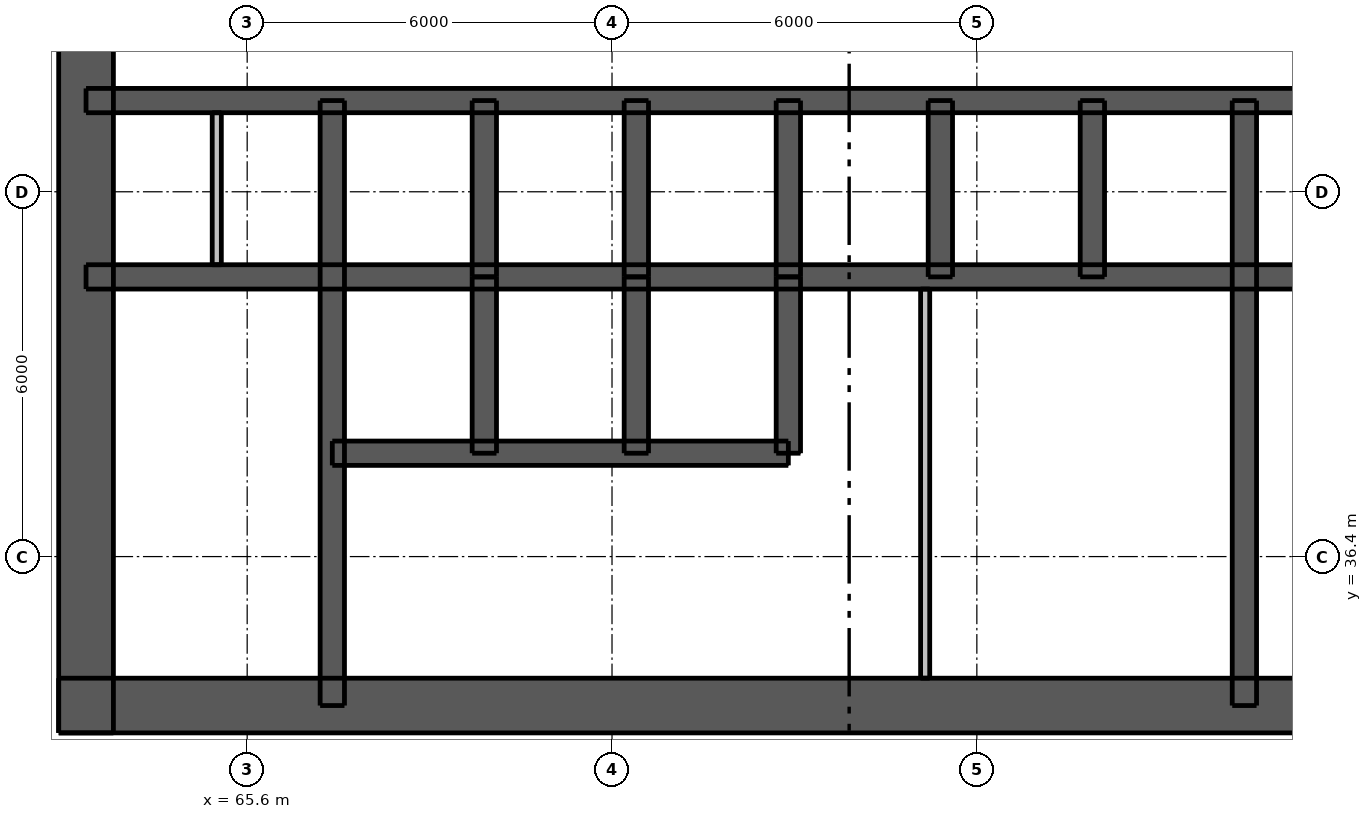
"""IFC4 building model, lengths in metres.
Left out: names, types, materials, properties, quantities, classifications, styles, units other than length and angle.
Written with IfcOpenShell. Run it as: python <this file> out.ifc"""

import sys

from ifc_helpers import new_model, si_unit, direction, frame, frame_2d, origin, place, context, subcontext, project, spatial, rectangle, extrude, element, fill, save


model = new_model("IFC4")
c1 = context("Model", 3, precision=1e-05, world=origin(), true_north=direction((0.0, 1.0)))
c2 = subcontext(c1, "Body", "Model", "MODEL_VIEW")
j1 = project(units=[si_unit("LENGTHUNIT", "METRE"), si_unit("PLANEANGLEUNIT", "RADIAN")], contexts=[c1])
p1 = place(None, origin())
s1 = spatial("IfcSite", under=j1, at=p1, CompositionType="ELEMENT")
p2 = place(p1, origin())
s2 = spatial("IfcBuilding", under=s1, at=p2, CompositionType="ELEMENT")
p3 = place(p2, frame((0.0, 0.0, 36.7)))
s3 = spatial("IfcBuildingStorey", under=s2, at=p3, CompositionType="ELEMENT", Elevation=36.7)
p4 = place(p3, frame((62.5, 33.95, 0.0), z_axis=(0.0, 0.0, 1.0), x_axis=(1.0, 0.0, 0.0)))
e1 = element("IfcWall", 1, at=p4, inside=s3, PredefinedType="SHEAR", context=c2, shape_type="SweptSolid", body=[
    extrude(rectangle(XDim=24.0, YDim=0.9, at=frame_2d((12.0, 0.0))), origin(), (0.0, 0.0, 1.0), 3.05),
])
p5 = place(p4, frame((2.05, 0.0, 0.0)))
e2 = element("IfcOpeningElement", 2, at=p5, cuts=e1, PredefinedType="OPENING", context=c2, shape_type="SweptSolid", body=[
    extrude(rectangle(XDim=1.1, YDim=2.1, at=frame_2d((0.55, 1.05))), frame((0.0, 0.46, 0.0), z_axis=(0.0, -1.0, 0.0), x_axis=(1.0, 0.0, 0.0)), (0.0, 0.0, 1.0), 0.92),
])
p6 = place(p4, frame((20.85, 0.0, 0.0)))
e3 = element("IfcOpeningElement", 3, at=p6, cuts=e1, PredefinedType="OPENING", context=c2, shape_type="SweptSolid", body=[
    extrude(rectangle(XDim=1.1, YDim=2.1, at=frame_2d((0.55, 1.05))), frame((0.0, 0.46, 0.0), z_axis=(0.0, -1.0, 0.0), x_axis=(1.0, 0.0, 0.0)), (0.0, 0.0, 1.0), 0.92),
])
p7 = place(p4, frame((8.0, 0.0, 0.0)))
e4 = element("IfcOpeningElement", 4, at=p7, cuts=e1, PredefinedType="OPENING", context=c2, shape_type="SweptSolid", body=[
    extrude(rectangle(XDim=1.1, YDim=2.1, at=frame_2d((0.55, 1.05))), frame((0.0, 0.46, 0.0), z_axis=(0.0, -1.0, 0.0), x_axis=(1.0, 0.0, 0.0)), (0.0, 0.0, 1.0), 0.92),
])
p8 = place(p4, frame((16.363, 0.0, 0.0)))
e5 = element("IfcOpeningElement", 5, at=p8, cuts=e1, PredefinedType="OPENING", context=c2, shape_type="SweptSolid", body=[
    extrude(rectangle(XDim=0.9, YDim=2.1, at=frame_2d((0.45, 1.05))), frame((0.0, 0.46, 0.0), z_axis=(0.0, -1.0, 0.0), x_axis=(1.0, 0.0, 0.0)), (0.0, 0.0, 1.0), 0.92),
])
p9 = place(p3, frame((62.95, 33.5, 0.0), z_axis=(0.0, 0.0, 1.0), x_axis=(0.0, 1.0, 0.0)))
e6 = element("IfcWall", 6, at=p9, inside=s3, PredefinedType="SHEAR", context=c2, shape_type="SweptSolid", body=[
    extrude(rectangle(XDim=24.0, YDim=0.9, at=frame_2d((12.0, 0.0))), origin(), (0.0, 0.0, 1.0), 3.05),
])
p10 = place(p9, frame((11.2, 0.0, 0.0)))
e7 = element("IfcOpeningElement", 7, at=p10, cuts=e6, PredefinedType="OPENING", context=c2, shape_type="SweptSolid", body=[
    extrude(rectangle(XDim=1.6, YDim=2.1, at=frame_2d((0.8, 1.05))), frame((0.0, 0.46, 0.0), z_axis=(0.0, -1.0, 0.0), x_axis=(1.0, 0.0, 0.0)), (0.0, 0.0, 1.0), 0.92),
])
p11 = place(p3, frame((62.95, 41.0, 0.0), z_axis=(0.0, 0.0, 1.0), x_axis=(1.0, 0.0, 0.0)))
e8 = element("IfcWall", 8, at=p11, inside=s3, PredefinedType="SHEAR", context=c2, shape_type="SweptSolid", body=[
    extrude(rectangle(XDim=23.1, YDim=0.4, at=frame_2d((11.55, 0.0))), origin(), (0.0, 0.0, 1.0), 3.05),
])
p12 = place(p3, frame((62.95, 43.9, 0.0), z_axis=(0.0, 0.0, 1.0), x_axis=(1.0, 0.0, 0.0)))
e9 = element("IfcWall", 9, at=p12, inside=s3, PredefinedType="SHEAR", context=c2, shape_type="SweptSolid", body=[
    extrude(rectangle(XDim=23.1, YDim=0.4, at=frame_2d((11.55, 0.0))), origin(), (0.0, 0.0, 1.0), 3.05),
])
p13 = place(p12, frame((0.85, 0.0, 0.0)))
e10 = element("IfcOpeningElement", 10, at=p13, cuts=e9, PredefinedType="OPENING", context=c2, shape_type="SweptSolid", body=[
    extrude(rectangle(XDim=0.9, YDim=2.1, at=frame_2d((0.45, 1.05))), frame((0.0, 0.21, 0.0), z_axis=(0.0, -1.0, 0.0), x_axis=(1.0, 0.0, 0.0)), (0.0, 0.0, 1.0), 0.42),
])
p14 = place(p12, frame((2.55, 0.0, 0.0)))
e11 = element("IfcOpeningElement", 11, at=p14, cuts=e9, PredefinedType="OPENING", context=c2, shape_type="SweptSolid", body=[
    extrude(rectangle(XDim=0.9, YDim=2.1, at=frame_2d((0.45, 1.05))), frame((0.0, 0.21, 0.0), z_axis=(0.0, -1.0, 0.0), x_axis=(1.0, 0.0, 0.0)), (0.0, 0.0, 1.0), 0.42),
])
p15 = place(p12, frame((20.5, 0.0, 0.0)))
e12 = element("IfcOpeningElement", 12, at=p15, cuts=e9, PredefinedType="OPENING", context=c2, shape_type="SweptSolid", body=[
    extrude(rectangle(XDim=0.9, YDim=2.1, at=frame_2d((0.45, 1.05))), frame((0.0, 0.21, 0.0), z_axis=(0.0, -1.0, 0.0), x_axis=(1.0, 0.0, 0.0)), (0.0, 0.0, 1.0), 0.42),
])
p16 = place(p12, frame((4.75, 0.0, 0.0)))
e13 = element("IfcOpeningElement", 13, at=p16, cuts=e9, PredefinedType="OPENING", context=c2, shape_type="SweptSolid", body=[
    extrude(rectangle(XDim=1.1, YDim=2.1, at=frame_2d((0.55, 1.05))), frame((0.0, 0.21, 0.0), z_axis=(0.0, -1.0, 0.0), x_axis=(1.0, 0.0, 0.0)), (0.0, 0.0, 1.0), 0.42),
])
p17 = place(p12, frame((7.25, 0.0, 0.0)))
e14 = element("IfcOpeningElement", 14, at=p17, cuts=e9, PredefinedType="OPENING", context=c2, shape_type="SweptSolid", body=[
    extrude(rectangle(XDim=1.1, YDim=2.1, at=frame_2d((0.55, 1.05))), frame((0.0, 0.21, 0.0), z_axis=(0.0, -1.0, 0.0), x_axis=(1.0, 0.0, 0.0)), (0.0, 0.0, 1.0), 0.42),
])
p18 = place(p12, frame((9.75, 0.0, 0.0)))
e15 = element("IfcOpeningElement", 15, at=p18, cuts=e9, PredefinedType="OPENING", context=c2, shape_type="SweptSolid", body=[
    extrude(rectangle(XDim=1.1, YDim=2.1, at=frame_2d((0.55, 1.05))), frame((0.0, 0.21, 0.0), z_axis=(0.0, -1.0, 0.0), x_axis=(1.0, 0.0, 0.0)), (0.0, 0.0, 1.0), 0.42),
])
p19 = place(p12, frame((12.25, 0.0, 0.0)))
e16 = element("IfcOpeningElement", 16, at=p19, cuts=e9, PredefinedType="OPENING", context=c2, shape_type="SweptSolid", body=[
    extrude(rectangle(XDim=1.1, YDim=2.1, at=frame_2d((0.55, 1.05))), frame((0.0, 0.21, 0.0), z_axis=(0.0, -1.0, 0.0), x_axis=(1.0, 0.0, 0.0)), (0.0, 0.0, 1.0), 0.42),
])
p20 = place(p12, frame((14.75, 0.0, 0.0)))
e17 = element("IfcOpeningElement", 17, at=p20, cuts=e9, PredefinedType="OPENING", context=c2, shape_type="SweptSolid", body=[
    extrude(rectangle(XDim=1.1, YDim=2.1, at=frame_2d((0.55, 1.05))), frame((0.0, 0.21, 0.0), z_axis=(0.0, -1.0, 0.0), x_axis=(1.0, 0.0, 0.0)), (0.0, 0.0, 1.0), 0.42),
])
p21 = place(p12, frame((17.25, 0.0, 0.0)))
e18 = element("IfcOpeningElement", 18, at=p21, cuts=e9, PredefinedType="OPENING", context=c2, shape_type="SweptSolid", body=[
    extrude(rectangle(XDim=1.1, YDim=2.1, at=frame_2d((0.55, 1.05))), frame((0.0, 0.21, 0.0), z_axis=(0.0, -1.0, 0.0), x_axis=(1.0, 0.0, 0.0)), (0.0, 0.0, 1.0), 0.42),
])
p22 = place(p3, frame((67.0, 33.95, 0.0), z_axis=(0.0, 0.0, 1.0), x_axis=(0.0, 1.0, 0.0)))
e19 = element("IfcWall", 19, at=p22, inside=s3, PredefinedType="SHEAR", context=c2, shape_type="SweptSolid", body=[
    extrude(rectangle(XDim=9.95, YDim=0.4, at=frame_2d((4.975, 0.0))), origin(), (0.0, 0.0, 1.0), 3.05),
])
p23 = place(p22, frame((0.65, 0.0, 0.0)))
e20 = element("IfcOpeningElement", 20, at=p23, cuts=e19, PredefinedType="OPENING", context=c2, shape_type="SweptSolid", body=[
    extrude(rectangle(XDim=1.1, YDim=2.1, at=frame_2d((0.55, 1.05))), frame((0.0, 0.21, 0.0), z_axis=(0.0, -1.0, 0.0), x_axis=(1.0, 0.0, 0.0)), (0.0, 0.0, 1.0), 0.42),
])
p24 = place(p3, frame((82.0, 33.95, 0.0), z_axis=(0.0, 0.0, 1.0), x_axis=(0.0, 1.0, 0.0)))
e21 = element("IfcWall", 21, at=p24, inside=s3, PredefinedType="SHEAR", context=c2, shape_type="SweptSolid", body=[
    extrude(rectangle(XDim=9.95, YDim=0.4, at=frame_2d((4.975, 0.0))), origin(), (0.0, 0.0, 1.0), 3.05),
])
for number, where, z_axis, x_axis in (
    (22, (69.5, 41.0, 0.0), (0.0, 0.0, 1.0), (0.0, 1.0, 0.0)),
    (23, (72.0, 41.0, 0.0), (0.0, 0.0, 1.0), (0.0, 1.0, 0.0)),
    (24, (74.5, 41.0, 0.0), (0.0, 0.0, 1.0), (0.0, 1.0, 0.0)),
    (25, (77.0, 41.0, 0.0), (0.0, 0.0, 1.0), (0.0, 1.0, 0.0)),
    (26, (79.5, 41.0, 0.0), (0.0, 0.0, 1.0), (0.0, 1.0, 0.0)),
):
    element("IfcWall", number, at=place(p3, frame(where, z_axis=z_axis, x_axis=x_axis)), inside=s3, PredefinedType="SHEAR", context=c2, shape_type="SweptSolid", body=[
        extrude(rectangle(XDim=2.9, YDim=0.4, at=frame_2d((1.45, 0.0))), origin(), (0.0, 0.0, 1.0), 3.05),
    ])
p25 = place(p3, frame((67.0, 38.1, 0.0), z_axis=(0.0, 0.0, 1.0), x_axis=(1.0, 0.0, 0.0)))
e27 = element("IfcWall", 27, at=p25, inside=s3, PredefinedType="SHEAR", context=c2, shape_type="SweptSolid", body=[
    extrude(rectangle(XDim=7.5, YDim=0.4, at=frame_2d((3.75, 0.0))), origin(), (0.0, 0.0, 1.0), 3.05),
])
p26 = place(p25, frame((0.7, 0.0, 0.0)))
e28 = element("IfcOpeningElement", 28, at=p26, cuts=e27, PredefinedType="OPENING", context=c2, shape_type="SweptSolid", body=[
    extrude(rectangle(XDim=1.1, YDim=2.1, at=frame_2d((0.55, 1.05))), frame((0.0, 0.21, 0.0), z_axis=(0.0, -1.0, 0.0), x_axis=(1.0, 0.0, 0.0)), (0.0, 0.0, 1.0), 0.42),
])
p27 = place(p25, frame((3.2, 0.0, 0.0)))
e29 = element("IfcOpeningElement", 29, at=p27, cuts=e27, PredefinedType="OPENING", context=c2, shape_type="SweptSolid", body=[
    extrude(rectangle(XDim=1.1, YDim=2.1, at=frame_2d((0.55, 1.05))), frame((0.0, 0.21, 0.0), z_axis=(0.0, -1.0, 0.0), x_axis=(1.0, 0.0, 0.0)), (0.0, 0.0, 1.0), 0.42),
])
p28 = place(p25, frame((5.65, 0.0, 0.0)))
e30 = element("IfcOpeningElement", 30, at=p28, cuts=e27, PredefinedType="OPENING", context=c2, shape_type="SweptSolid", body=[
    extrude(rectangle(XDim=1.2, YDim=2.1, at=frame_2d((0.6, 1.05))), frame((0.0, 0.21, 0.0), z_axis=(0.0, -1.0, 0.0), x_axis=(1.0, 0.0, 0.0)), (0.0, 0.0, 1.0), 0.42),
])
for number, where, z_axis, x_axis in (
    (31, (69.5, 38.1, 0.0), (0.0, 0.0, 1.0), (0.0, 1.0, 0.0)),
    (32, (72.0, 38.1, 0.0), (0.0, 0.0, 1.0), (0.0, 1.0, 0.0)),
    (33, (74.5, 38.1, 0.0), (0.0, 0.0, 1.0), (0.0, 1.0, 0.0)),
):
    element("IfcWall", number, at=place(p3, frame(where, z_axis=z_axis, x_axis=x_axis)), inside=s3, PredefinedType="SHEAR", context=c2, shape_type="SweptSolid", body=[
        extrude(rectangle(XDim=2.9, YDim=0.4, at=frame_2d((1.45, 0.0))), origin(), (0.0, 0.0, 1.0), 3.05),
    ])
p29 = place(p3, frame((76.75, 34.4, 0.0), z_axis=(0.0, 0.0, 1.0), x_axis=(0.0, 1.0, 0.0)))
e34 = element("IfcWall", 34, at=p29, inside=s3, PredefinedType="PLUMBINGWALL", context=c2, shape_type="SweptSolid", body=[
    extrude(rectangle(XDim=6.4, YDim=0.15, at=frame_2d((3.2, 0.0))), origin(), (0.0, 0.0, 1.0), 3.05),
])
p30 = place(p3, frame((65.1, 41.2, 0.0), z_axis=(0.0, 0.0, 1.0), x_axis=(0.0, 1.0, 0.0)))
e35 = element("IfcWall", 35, at=p30, inside=s3, PredefinedType="PLUMBINGWALL", context=c2, shape_type="SweptSolid", body=[
    extrude(rectangle(XDim=2.5, YDim=0.15, at=frame_2d((1.25, 0.0))), origin(), (0.0, 0.0, 1.0), 3.05),
])
p31 = place(p5, origin())
e36 = element("IfcDoor", 36, at=p31, inside=s3, OperationType="SINGLE_SWING_LEFT", PredefinedType="DOOR", context=c2, shape_type="SweptSolid", body=[
    extrude(rectangle(XDim=1.1, YDim=2.1, at=frame_2d((0.55, 1.05))), frame((0.0, 0.438, 0.0), z_axis=(0.0, -1.0, 0.0), x_axis=(1.0, 0.0, 0.0)), (0.0, 0.0, 1.0), 0.05),
])
fill(e2, e36)
p32 = place(p7, origin())
e37 = element("IfcDoor", 37, at=p32, inside=s3, OperationType="SINGLE_SWING_LEFT", PredefinedType="DOOR", context=c2, shape_type="SweptSolid", body=[
    extrude(rectangle(XDim=1.1, YDim=2.1, at=frame_2d((0.55, 1.05))), frame((0.0, 0.438, 0.0), z_axis=(0.0, -1.0, 0.0), x_axis=(1.0, 0.0, 0.0)), (0.0, 0.0, 1.0), 0.05),
])
fill(e4, e37)
p33 = place(p23, origin())
e38 = element("IfcDoor", 38, at=p33, inside=s3, OperationType="SINGLE_SWING_RIGHT", PredefinedType="DOOR", context=c2, shape_type="SweptSolid", body=[
    extrude(rectangle(XDim=1.1, YDim=2.1, at=frame_2d((0.55, 1.05))), frame((0.0, -0.138, 0.0), z_axis=(0.0, -1.0, 0.0), x_axis=(1.0, 0.0, 0.0)), (0.0, 0.0, 1.0), 0.05),
])
fill(e20, e38)
p34 = place(p8, origin())
e39 = element("IfcDoor", 39, at=p34, inside=s3, OperationType="SINGLE_SWING_LEFT", PredefinedType="DOOR", context=c2, shape_type="SweptSolid", body=[
    extrude(rectangle(XDim=0.9, YDim=2.1, at=frame_2d((0.45, 1.05))), frame((0.0, 0.438, 0.0), z_axis=(0.0, -1.0, 0.0), x_axis=(1.0, 0.0, 0.0)), (0.0, 0.0, 1.0), 0.05),
])
fill(e5, e39)
p35 = place(p13, origin())
e40 = element("IfcDoor", 40, at=p35, inside=s3, OperationType="SINGLE_SWING_LEFT", PredefinedType="DOOR", context=c2, shape_type="SweptSolid", body=[
    extrude(rectangle(XDim=0.9, YDim=2.1, at=frame_2d((0.45, 1.05))), frame((0.0, -0.138, 0.0), z_axis=(0.0, -1.0, 0.0), x_axis=(1.0, 0.0, 0.0)), (0.0, 0.0, 1.0), 0.05),
])
fill(e10, e40)
p36 = place(p14, origin())
e41 = element("IfcDoor", 41, at=p36, inside=s3, OperationType="SINGLE_SWING_RIGHT", PredefinedType="DOOR", context=c2, shape_type="SweptSolid", body=[
    extrude(rectangle(XDim=0.9, YDim=2.1, at=frame_2d((0.45, 1.05))), frame((0.0, -0.138, 0.0), z_axis=(0.0, -1.0, 0.0), x_axis=(1.0, 0.0, 0.0)), (0.0, 0.0, 1.0), 0.05),
])
fill(e11, e41)
p37 = place(p16, origin())
e42 = element("IfcDoor", 42, at=p37, inside=s3, OperationType="DOUBLE_DOOR_SLIDING", PredefinedType="DOOR", context=c2, shape_type="SweptSolid", body=[
    extrude(rectangle(XDim=1.1, YDim=2.1, at=frame_2d((0.55, 1.05))), frame((0.0, 0.025, 0.0), z_axis=(0.0, -1.0, 0.0), x_axis=(1.0, 0.0, 0.0)), (0.0, 0.0, 1.0), 0.05),
])
fill(e13, e42)
p38 = place(p17, origin())
e43 = element("IfcDoor", 43, at=p38, inside=s3, OperationType="DOUBLE_DOOR_SLIDING", PredefinedType="DOOR", context=c2, shape_type="SweptSolid", body=[
    extrude(rectangle(XDim=1.1, YDim=2.1, at=frame_2d((0.55, 1.05))), frame((0.0, 0.025, 0.0), z_axis=(0.0, -1.0, 0.0), x_axis=(1.0, 0.0, 0.0)), (0.0, 0.0, 1.0), 0.05),
])
fill(e14, e43)
p39 = place(p18, origin())
e44 = element("IfcDoor", 44, at=p39, inside=s3, OperationType="DOUBLE_DOOR_SLIDING", PredefinedType="DOOR", context=c2, shape_type="SweptSolid", body=[
    extrude(rectangle(XDim=1.1, YDim=2.1, at=frame_2d((0.55, 1.05))), frame((0.0, 0.025, 0.0), z_axis=(0.0, -1.0, 0.0), x_axis=(1.0, 0.0, 0.0)), (0.0, 0.0, 1.0), 0.05),
])
fill(e15, e44)
p40 = place(p19, origin())
e45 = element("IfcDoor", 45, at=p40, inside=s3, OperationType="DOUBLE_DOOR_SLIDING", PredefinedType="DOOR", context=c2, shape_type="SweptSolid", body=[
    extrude(rectangle(XDim=1.1, YDim=2.1, at=frame_2d((0.55, 1.05))), frame((0.0, 0.025, 0.0), z_axis=(0.0, -1.0, 0.0), x_axis=(1.0, 0.0, 0.0)), (0.0, 0.0, 1.0), 0.05),
])
fill(e16, e45)
p41 = place(p20, origin())
e46 = element("IfcDoor", 46, at=p41, inside=s3, OperationType="DOUBLE_DOOR_SLIDING", PredefinedType="DOOR", context=c2, shape_type="SweptSolid", body=[
    extrude(rectangle(XDim=1.1, YDim=2.1, at=frame_2d((0.55, 1.05))), frame((0.0, 0.025, 0.0), z_axis=(0.0, -1.0, 0.0), x_axis=(1.0, 0.0, 0.0)), (0.0, 0.0, 1.0), 0.05),
])
fill(e17, e46)
p42 = place(p21, origin())
e47 = element("IfcDoor", 47, at=p42, inside=s3, OperationType="DOUBLE_DOOR_SLIDING", PredefinedType="DOOR", context=c2, shape_type="SweptSolid", body=[
    extrude(rectangle(XDim=1.1, YDim=2.1, at=frame_2d((0.55, 1.05))), frame((0.0, 0.025, 0.0), z_axis=(0.0, -1.0, 0.0), x_axis=(1.0, 0.0, 0.0)), (0.0, 0.0, 1.0), 0.05),
])
fill(e18, e47)
p43 = place(p26, origin())
e48 = element("IfcDoor", 48, at=p43, inside=s3, OperationType="DOUBLE_DOOR_SLIDING", PredefinedType="DOOR", context=c2, shape_type="SweptSolid", body=[
    extrude(rectangle(XDim=1.1, YDim=2.1, at=frame_2d((0.55, 1.05))), frame((0.0, 0.025, 0.0), z_axis=(0.0, -1.0, 0.0), x_axis=(1.0, 0.0, 0.0)), (0.0, 0.0, 1.0), 0.05),
])
fill(e28, e48)
p44 = place(p27, origin())
e49 = element("IfcDoor", 49, at=p44, inside=s3, OperationType="DOUBLE_DOOR_SLIDING", PredefinedType="DOOR", context=c2, shape_type="SweptSolid", body=[
    extrude(rectangle(XDim=1.1, YDim=2.1, at=frame_2d((0.55, 1.05))), frame((0.0, 0.025, 0.0), z_axis=(0.0, -1.0, 0.0), x_axis=(1.0, 0.0, 0.0)), (0.0, 0.0, 1.0), 0.05),
])
fill(e29, e49)
p45 = place(p28, origin())
e50 = element("IfcDoor", 50, at=p45, inside=s3, OperationType="DOUBLE_DOOR_SLIDING", PredefinedType="DOOR", context=c2, shape_type="SweptSolid", body=[
    extrude(rectangle(XDim=1.2, YDim=2.1, at=frame_2d((0.6, 1.05))), frame((0.0, 0.025, 0.0), z_axis=(0.0, -1.0, 0.0), x_axis=(1.0, 0.0, 0.0)), (0.0, 0.0, 1.0), 0.05),
])
fill(e30, e50)
save(model, sys.argv[1])
